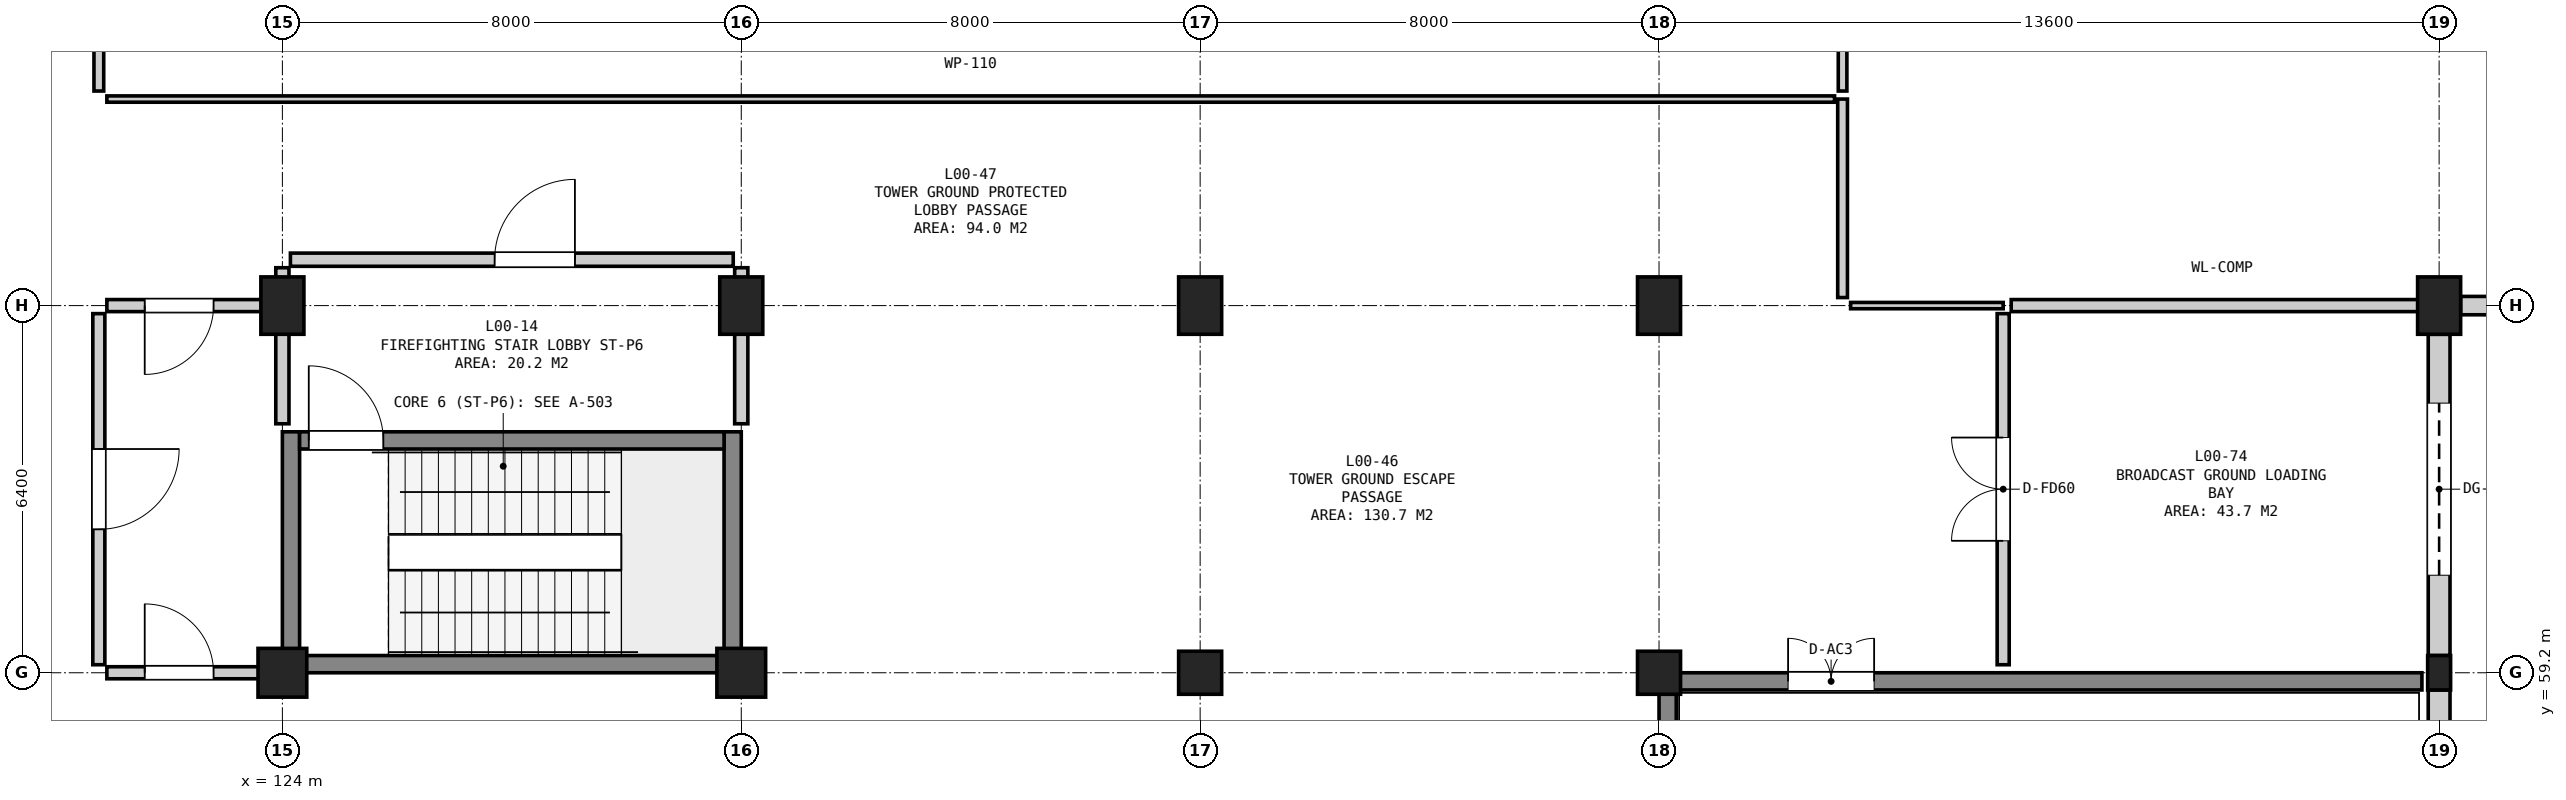
"""IFC4 building model, lengths in metres.
Left out: names, types, materials, properties, quantities, classifications, styles, units other than length and angle.
Written with IfcOpenShell. Run it as: python <this file> out.ifc"""

import sys

from ifc_helpers import new_model, si_unit, direction, frame, frame_2d, origin, origin_2d, place, context, subcontext, project, spatial, rectangle, extrude, element, fill, save


model = new_model("IFC4")
c1 = context("Model", 3, precision=1e-05, world=origin(), true_north=direction((0.0, 1.0)))
c2 = subcontext(c1, "Body", "Model", "MODEL_VIEW")
j1 = project(units=[si_unit("LENGTHUNIT", "METRE"), si_unit("PLANEANGLEUNIT", "RADIAN")], contexts=[c1])
p1 = place(None, origin())
s1 = spatial("IfcSite", under=j1, at=p1, CompositionType="ELEMENT")
p2 = place(p1, origin())
s2 = spatial("IfcBuilding", under=s1, at=p2, CompositionType="ELEMENT")
p3 = place(p2, origin())
s3 = spatial("IfcBuildingStorey", under=s2, at=p3, CompositionType="ELEMENT", Elevation=0.0)
p4 = place(p3, frame((124.0, 59.2, 0.0), z_axis=(0.0, 0.0, 1.0), x_axis=(1.0, 0.0, 0.0)))
e1 = element("IfcColumn", 1, at=p4, inside=s3, PredefinedType="COLUMN", context=c2, shape_type="SweptSolid", body=[
    extrude(rectangle(XDim=0.85, YDim=0.85, at=origin_2d()), origin(), (0.0, 0.0, 1.0), 5.4),
])
p5 = place(p3, frame((124.0, 65.6, 0.0), z_axis=(0.0, 0.0, 1.0), x_axis=(1.0, 0.0, 0.0)))
e2 = element("IfcColumn", 2, at=p5, inside=s3, PredefinedType="COLUMN", context=c2, shape_type="SweptSolid", body=[
    extrude(rectangle(XDim=0.75, YDim=1.0, at=origin_2d()), origin(), (0.0, 0.0, 1.0), 5.4),
])
p6 = place(p3, frame((132.0, 59.2, 0.0), z_axis=(0.0, 0.0, 1.0), x_axis=(1.0, 0.0, 0.0)))
e3 = element("IfcColumn", 3, at=p6, inside=s3, PredefinedType="COLUMN", context=c2, shape_type="SweptSolid", body=[
    extrude(rectangle(XDim=0.85, YDim=0.85, at=origin_2d()), origin(), (0.0, 0.0, 1.0), 5.4),
])
p7 = place(p3, frame((132.0, 65.6, 0.0), z_axis=(0.0, 0.0, 1.0), x_axis=(1.0, 0.0, 0.0)))
e4 = element("IfcColumn", 4, at=p7, inside=s3, PredefinedType="COLUMN", context=c2, shape_type="SweptSolid", body=[
    extrude(rectangle(XDim=0.75, YDim=1.0, at=origin_2d()), origin(), (0.0, 0.0, 1.0), 5.4),
])
p8 = place(p3, frame((140.0, 59.2, 0.0), z_axis=(0.0, 0.0, 1.0), x_axis=(1.0, 0.0, 0.0)))
e5 = element("IfcColumn", 5, at=p8, inside=s3, PredefinedType="COLUMN", context=c2, shape_type="SweptSolid", body=[
    extrude(rectangle(XDim=0.75, YDim=0.75, at=origin_2d()), origin(), (0.0, 0.0, 1.0), 5.4),
])
p9 = place(p3, frame((140.0, 65.6, 0.0), z_axis=(0.0, 0.0, 1.0), x_axis=(1.0, 0.0, 0.0)))
e6 = element("IfcColumn", 6, at=p9, inside=s3, PredefinedType="COLUMN", context=c2, shape_type="SweptSolid", body=[
    extrude(rectangle(XDim=0.75, YDim=1.0, at=origin_2d()), origin(), (0.0, 0.0, 1.0), 5.4),
])
p10 = place(p3, frame((148.0, 59.2, 0.0), z_axis=(0.0, 0.0, 1.0), x_axis=(1.0, 0.0, 0.0)))
e7 = element("IfcColumn", 7, at=p10, inside=s3, PredefinedType="COLUMN", context=c2, shape_type="SweptSolid", body=[
    extrude(rectangle(XDim=0.75, YDim=0.75, at=origin_2d()), origin(), (0.0, 0.0, 1.0), 5.4),
])
p11 = place(p3, frame((148.0, 65.6, 0.0), z_axis=(0.0, 0.0, 1.0), x_axis=(1.0, 0.0, 0.0)))
e8 = element("IfcColumn", 8, at=p11, inside=s3, PredefinedType="COLUMN", context=c2, shape_type="SweptSolid", body=[
    extrude(rectangle(XDim=0.75, YDim=1.0, at=origin_2d()), origin(), (0.0, 0.0, 1.0), 5.4),
])
p12 = place(p3, frame((161.6, 59.2, 0.0), z_axis=(0.0, 0.0, 1.0), x_axis=(1.0, 0.0, 0.0)))
e9 = element("IfcColumn", 9, at=p12, inside=s3, PredefinedType="COLUMN", context=c2, shape_type="SweptSolid", body=[
    extrude(rectangle(XDim=0.4, YDim=0.6, at=origin_2d()), origin(), (0.0, 0.0, 1.0), 5.4),
])
p13 = place(p3, frame((161.6, 65.6, 0.0), z_axis=(0.0, 0.0, 1.0), x_axis=(1.0, 0.0, 0.0)))
e10 = element("IfcColumn", 10, at=p13, inside=s3, PredefinedType="COLUMN", context=c2, shape_type="SweptSolid", body=[
    extrude(rectangle(XDim=0.75, YDim=1.0, at=origin_2d()), origin(), (0.0, 0.0, 1.0), 5.4),
])
p14 = place(p3, frame((161.6, 51.525, 0.0), z_axis=(0.0, 0.0, 1.0), x_axis=(0.0, 1.0, 0.0)))
e11 = element("IfcWall", 11, at=p14, inside=s3, PredefinedType="SOLIDWALL", context=c2, shape_type="SweptSolid", body=[
    extrude(rectangle(XDim=7.375, YDim=0.38, at=frame_2d((3.688, 0.0))), origin(), (0.0, 0.0, 1.0), 4.515),
])
p15 = place(p3, frame((161.6, 59.5, 0.0), z_axis=(0.0, 0.0, 1.0), x_axis=(0.0, 1.0, 0.0)))
e12 = element("IfcWall", 12, at=p15, inside=s3, PredefinedType="SOLIDWALL", context=c2, shape_type="SweptSolid", body=[
    extrude(rectangle(XDim=5.6, YDim=0.38, at=frame_2d((2.8, 0.0))), origin(), (0.0, 0.0, 1.0), 4.495),
])
p16 = place(p15, frame((1.4, 0.0, 0.0)))
e13 = element("IfcOpeningElement", 13, at=p16, cuts=e12, PredefinedType="OPENING", context=c2, shape_type="SweptSolid", body=[
    extrude(rectangle(XDim=3.0, YDim=3.2, at=frame_2d((1.5, 1.6))), frame((0.0, 0.202, 0.0), z_axis=(0.0, -1.0, 0.0), x_axis=(1.0, 0.0, 0.0)), (0.0, 0.0, 1.0), 0.404),
])
p17 = place(p3, frame((161.975, 65.6, 0.0), z_axis=(0.0, 0.0, 1.0), x_axis=(1.0, 0.0, 0.0)))
e14 = element("IfcWall", 14, at=p17, inside=s3, PredefinedType="SOLIDWALL", context=c2, shape_type="SweptSolid", body=[
    extrude(rectangle(XDim=5.65, YDim=0.32, at=frame_2d((2.825, 0.0))), origin(), (0.0, 0.0, 1.0), 4.48),
])
p18 = place(p17, frame((2.225, 0.0, 0.9)))
e15 = element("IfcOpeningElement", 15, at=p18, cuts=e14, PredefinedType="OPENING", context=c2, shape_type="SweptSolid", body=[
    extrude(rectangle(XDim=1.2, YDim=1.7, at=frame_2d((0.6, 0.85))), frame((0.0, 0.172, 0.0), z_axis=(0.0, -1.0, 0.0), x_axis=(1.0, 0.0, 0.0)), (0.0, 0.0, 1.0), 0.344),
])
p19 = place(p3, frame((148.3, 59.05, 0.0), z_axis=(0.0, 0.0, 1.0), x_axis=(1.0, 0.0, 0.0)))
e16 = element("IfcWall", 16, at=p19, inside=s3, PredefinedType="SHEAR", context=c2, shape_type="SweptSolid", body=[
    extrude(rectangle(XDim=13.0, YDim=0.3, at=frame_2d((6.5, 0.0))), origin(), (0.0, 0.0, 1.0), 5.08),
])
p20 = place(p19, frame((1.95, 0.0, 0.0)))
e17 = element("IfcOpeningElement", 17, at=p20, cuts=e16, PredefinedType="OPENING", context=c2, shape_type="SweptSolid", body=[
    extrude(rectangle(XDim=1.5, YDim=2.2, at=frame_2d((0.75, 1.1))), frame((0.0, 0.162, 0.0), z_axis=(0.0, -1.0, 0.0), x_axis=(1.0, 0.0, 0.0)), (0.0, 0.0, 1.0), 0.324),
])
p21 = place(p3, frame((148.15, 51.35, 0.0), z_axis=(0.0, 0.0, 1.0), x_axis=(0.0, 1.0, 0.0)))
e18 = element("IfcWall", 18, at=p21, inside=s3, PredefinedType="SHEAR", context=c2, shape_type="SweptSolid", body=[
    extrude(rectangle(XDim=7.85, YDim=0.3, at=frame_2d((3.925, 0.0))), origin(), (0.0, 0.0, 1.0), 5.08),
])
for number, where, z_axis, x_axis in (
    (19, (124.15, 59.2, 0.0), (0.0, 0.0, 1.0), (0.0, 1.0, 0.0)),
    (20, (131.85, 59.2, 0.0), (0.0, 0.0, 1.0), (0.0, 1.0, 0.0)),
):
    element("IfcWall", number, at=place(p3, frame(where, z_axis=z_axis, x_axis=x_axis)), inside=s3, PredefinedType="SHEAR", context=c2, shape_type="SweptSolid", body=[
        extrude(rectangle(XDim=4.2, YDim=0.3, at=frame_2d((2.1, 0.0))), origin(), (0.0, 0.0, 1.0), 5.08),
    ])
p22 = place(p3, frame((124.3, 59.35, 0.0), z_axis=(0.0, 0.0, 1.0), x_axis=(1.0, 0.0, 0.0)))
e21 = element("IfcWall", 21, at=p22, inside=s3, PredefinedType="SHEAR", context=c2, shape_type="SweptSolid", body=[
    extrude(rectangle(XDim=7.4, YDim=0.3, at=frame_2d((3.7, 0.0))), origin(), (0.0, 0.0, 1.0), 5.08),
])
p23 = place(p3, frame((124.3, 63.25, 0.0), z_axis=(0.0, 0.0, 1.0), x_axis=(1.0, 0.0, 0.0)))
e22 = element("IfcWall", 22, at=p23, inside=s3, PredefinedType="SHEAR", context=c2, shape_type="SweptSolid", body=[
    extrude(rectangle(XDim=7.4, YDim=0.3, at=frame_2d((3.7, 0.0))), origin(), (0.0, 0.0, 1.0), 5.08),
])
p24 = place(p23, frame((0.16, 0.0, 0.0)))
e23 = element("IfcOpeningElement", 23, at=p24, cuts=e22, PredefinedType="OPENING", context=c2, shape_type="SweptSolid", body=[
    extrude(rectangle(XDim=1.3, YDim=2.18, at=frame_2d((0.65, 1.09))), frame((0.0, 0.162, 0.0), z_axis=(0.0, -1.0, 0.0), x_axis=(1.0, 0.0, 0.0)), (0.0, 0.0, 1.0), 0.324),
])
p25 = place(p3, frame((124.14, 66.4, 0.0), z_axis=(0.0, 0.0, 1.0), x_axis=(1.0, 0.0, 0.0)))
e24 = element("IfcWall", 24, at=p25, inside=s3, PredefinedType="SOLIDWALL", context=c2, shape_type="SweptSolid", body=[
    extrude(rectangle(XDim=7.72, YDim=0.23, at=frame_2d((3.86, 0.0))), origin(), (0.0, 0.0, 1.0), 5.08),
])
p26 = place(p25, frame((3.56, 0.0, 0.0)))
e25 = element("IfcOpeningElement", 25, at=p26, cuts=e24, PredefinedType="OPENING", context=c2, shape_type="SweptSolid", body=[
    extrude(rectangle(XDim=1.4, YDim=2.2, at=frame_2d((0.7, 1.1))), frame((0.0, 0.127, 0.0), z_axis=(0.0, -1.0, 0.0), x_axis=(1.0, 0.0, 0.0)), (0.0, 0.0, 1.0), 0.254),
])
p27 = place(p3, frame((124.0, 63.54, 0.0), z_axis=(0.0, 0.0, 1.0), x_axis=(0.0, 1.0, 0.0)))
e26 = element("IfcWall", 26, at=p27, inside=s3, PredefinedType="SOLIDWALL", context=c2, shape_type="SweptSolid", body=[
    extrude(rectangle(XDim=2.72, YDim=0.23, at=frame_2d((1.36, 0.0))), origin(), (0.0, 0.0, 1.0), 4.225),
])
p28 = place(p3, frame((132.0, 63.54, 0.0), z_axis=(0.0, 0.0, 1.0), x_axis=(0.0, 1.0, 0.0)))
e27 = element("IfcWall", 27, at=p28, inside=s3, PredefinedType="SOLIDWALL", context=c2, shape_type="SweptSolid", body=[
    extrude(rectangle(XDim=2.72, YDim=0.23, at=frame_2d((1.36, 0.0))), origin(), (0.0, 0.0, 1.0), 4.575),
])
p29 = place(p3, frame((120.94, 59.2, 0.0), z_axis=(0.0, 0.0, 1.0), x_axis=(1.0, 0.0, 0.0)))
e28 = element("IfcWall", 28, at=p29, inside=s3, PredefinedType="SOLIDWALL", context=c2, shape_type="SweptSolid", body=[
    extrude(rectangle(XDim=2.92, YDim=0.21, at=frame_2d((1.46, 0.0))), origin(), (0.0, 0.0, 1.0), 4.475),
])
p30 = place(p29, frame((0.66, 0.0, 0.0)))
e29 = element("IfcOpeningElement", 29, at=p30, cuts=e28, PredefinedType="OPENING", context=c2, shape_type="SweptSolid", body=[
    extrude(rectangle(XDim=1.2, YDim=2.2, at=frame_2d((0.6, 1.1))), frame((0.0, 0.117, 0.0), z_axis=(0.0, -1.0, 0.0), x_axis=(1.0, 0.0, 0.0)), (0.0, 0.0, 1.0), 0.234),
])
p31 = place(p3, frame((120.94, 65.6, 0.0), z_axis=(0.0, 0.0, 1.0), x_axis=(1.0, 0.0, 0.0)))
e30 = element("IfcWall", 30, at=p31, inside=s3, PredefinedType="SOLIDWALL", context=c2, shape_type="SweptSolid", body=[
    extrude(rectangle(XDim=2.92, YDim=0.21, at=frame_2d((1.46, 0.0))), origin(), (0.0, 0.0, 1.0), 4.275),
])
p32 = place(p31, frame((0.66, 0.0, 0.0)))
e31 = element("IfcOpeningElement", 31, at=p32, cuts=e30, PredefinedType="OPENING", context=c2, shape_type="SweptSolid", body=[
    extrude(rectangle(XDim=1.2, YDim=2.2, at=frame_2d((0.6, 1.1))), frame((0.0, 0.117, 0.0), z_axis=(0.0, -1.0, 0.0), x_axis=(1.0, 0.0, 0.0)), (0.0, 0.0, 1.0), 0.234),
])
p33 = place(p3, frame((120.8, 59.34, 0.0), z_axis=(0.0, 0.0, 1.0), x_axis=(0.0, 1.0, 0.0)))
e32 = element("IfcWall", 32, at=p33, inside=s3, PredefinedType="SOLIDWALL", context=c2, shape_type="SweptSolid", body=[
    extrude(rectangle(XDim=6.12, YDim=0.21, at=frame_2d((3.06, 0.0))), origin(), (0.0, 0.0, 1.0), 5.08),
])
p34 = place(p33, frame((2.36, 0.0, 0.0)))
e33 = element("IfcOpeningElement", 33, at=p34, cuts=e32, PredefinedType="OPENING", context=c2, shape_type="SweptSolid", body=[
    extrude(rectangle(XDim=1.4, YDim=2.2, at=frame_2d((0.7, 1.1))), frame((0.0, 0.117, 0.0), z_axis=(0.0, -1.0, 0.0), x_axis=(1.0, 0.0, 0.0)), (0.0, 0.0, 1.0), 0.234),
])
p35 = place(p3, frame((154.14, 65.6, 0.0), z_axis=(0.0, 0.0, 1.0), x_axis=(1.0, 0.0, 0.0)))
e34 = element("IfcWall", 34, at=p35, inside=s3, PredefinedType="SOLIDWALL", context=c2, shape_type="SweptSolid", body=[
    extrude(rectangle(XDim=7.355, YDim=0.21, at=frame_2d((3.678, 0.0))), origin(), (0.0, 0.0, 1.0), 4.025),
])
p36 = place(p3, frame((154.0, 59.34, 0.0), z_axis=(0.0, 0.0, 1.0), x_axis=(0.0, 1.0, 0.0)))
e35 = element("IfcWall", 35, at=p36, inside=s3, PredefinedType="SOLIDWALL", context=c2, shape_type="SweptSolid", body=[
    extrude(rectangle(XDim=6.12, YDim=0.21, at=frame_2d((3.06, 0.0))), origin(), (0.0, 0.0, 1.0), 5.08),
])
p37 = place(p36, frame((2.16, 0.0, 0.0)))
e36 = element("IfcOpeningElement", 36, at=p37, cuts=e35, PredefinedType="OPENING", context=c2, shape_type="SweptSolid", body=[
    extrude(rectangle(XDim=1.8, YDim=2.3, at=frame_2d((0.9, 1.15))), frame((0.0, 0.117, 0.0), z_axis=(0.0, -1.0, 0.0), x_axis=(1.0, 0.0, 0.0)), (0.0, 0.0, 1.0), 0.234),
])
p38 = place(p3, frame((120.94, 69.2, 0.0), z_axis=(0.0, 0.0, 1.0), x_axis=(1.0, 0.0, 0.0)))
e37 = element("IfcWall", 37, at=p38, inside=s3, PredefinedType="PARTITIONING", context=c2, shape_type="SweptSolid", body=[
    extrude(rectangle(XDim=30.12, YDim=0.11, at=frame_2d((15.06, 0.0))), origin(), (0.0, 0.0, 1.0), 5.08),
])
p39 = place(p3, frame((120.8, 69.34, 0.0), z_axis=(0.0, 0.0, 1.0), x_axis=(0.0, 1.0, 0.0)))
e38 = element("IfcWall", 38, at=p39, inside=s3, PredefinedType="PARTITIONING", context=c2, shape_type="SweptSolid", body=[
    extrude(rectangle(XDim=6.52, YDim=0.17, at=frame_2d((3.26, 0.0))), origin(), (0.0, 0.0, 1.0), 5.08),
])
p40 = place(p3, frame((151.2, 69.34, 0.0), z_axis=(0.0, 0.0, 1.0), x_axis=(0.0, 1.0, 0.0)))
e39 = element("IfcWall", 39, at=p40, inside=s3, PredefinedType="PARTITIONING", context=c2, shape_type="SweptSolid", body=[
    extrude(rectangle(XDim=6.52, YDim=0.15, at=frame_2d((3.26, 0.0))), origin(), (0.0, 0.0, 1.0), 5.08),
])
p41 = place(p3, frame((151.34, 65.6, 0.0), z_axis=(0.0, 0.0, 1.0), x_axis=(1.0, 0.0, 0.0)))
e40 = element("IfcWall", 40, at=p41, inside=s3, PredefinedType="PARTITIONING", context=c2, shape_type="SweptSolid", body=[
    extrude(rectangle(XDim=2.66, YDim=0.11, at=frame_2d((1.33, 0.0))), origin(), (0.0, 0.0, 1.0), 4.025),
])
p42 = place(p3, frame((151.2, 65.74, 0.0), z_axis=(0.0, 0.0, 1.0), x_axis=(0.0, 1.0, 0.0)))
e41 = element("IfcWall", 41, at=p42, inside=s3, PredefinedType="PARTITIONING", context=c2, shape_type="SweptSolid", body=[
    extrude(rectangle(XDim=3.46, YDim=0.17, at=frame_2d((1.73, 0.0))), origin(), (0.0, 0.0, 1.0), 5.08),
])
p43 = place(p16, frame((3.0, 0.0, 0.0), z_axis=(0.0, 0.0, 1.0), x_axis=(-1.0, 0.0, 0.0)))
e42 = element("IfcDoor", 42, at=p43, inside=s3, OperationType="ROLLINGUP", PredefinedType="GATE", context=c2, shape_type="SweptSolid", body=[
    extrude(rectangle(XDim=3.0, YDim=3.2, at=frame_2d((1.5, 1.6))), frame((0.0, 0.025, 0.0), z_axis=(0.0, -1.0, 0.0), x_axis=(1.0, 0.0, 0.0)), (0.0, 0.0, 1.0), 0.05),
])
fill(e13, e42)
p44 = place(p20, origin())
e43 = element("IfcDoor", 43, at=p44, inside=s3, OperationType="DOUBLE_DOOR_SINGLE_SWING", PredefinedType="DOOR", context=c2, shape_type="SweptSolid", body=[
    extrude(rectangle(XDim=1.5, YDim=2.2, at=frame_2d((0.75, 1.1))), frame((0.0, 0.025, 0.0), z_axis=(0.0, -1.0, 0.0), x_axis=(1.0, 0.0, 0.0)), (0.0, 0.0, 1.0), 0.05),
])
fill(e17, e43)
p45 = place(p24, origin())
e44 = element("IfcDoor", 44, at=p45, inside=s3, OperationType="SINGLE_SWING_LEFT", PredefinedType="DOOR", context=c2, shape_type="SweptSolid", body=[
    extrude(rectangle(XDim=1.3, YDim=2.18, at=frame_2d((0.65, 1.09))), frame((0.0, 0.025, 0.0), z_axis=(0.0, -1.0, 0.0), x_axis=(1.0, 0.0, 0.0)), (0.0, 0.0, 1.0), 0.05),
])
fill(e23, e44)
p46 = place(p26, origin())
e45 = element("IfcDoor", 45, at=p46, inside=s3, OperationType="SINGLE_SWING_RIGHT", PredefinedType="DOOR", context=c2, shape_type="SweptSolid", body=[
    extrude(rectangle(XDim=1.4, YDim=2.2, at=frame_2d((0.7, 1.1))), frame((0.0, 0.025, 0.0), z_axis=(0.0, -1.0, 0.0), x_axis=(1.0, 0.0, 0.0)), (0.0, 0.0, 1.0), 0.05),
])
fill(e25, e45)
p47 = place(p30, origin())
e46 = element("IfcDoor", 46, at=p47, inside=s3, OperationType="SINGLE_SWING_LEFT", PredefinedType="DOOR", context=c2, shape_type="SweptSolid", body=[
    extrude(rectangle(XDim=1.2, YDim=2.2, at=frame_2d((0.6, 1.1))), frame((0.0, 0.025, 0.0), z_axis=(0.0, -1.0, 0.0), x_axis=(1.0, 0.0, 0.0)), (0.0, 0.0, 1.0), 0.05),
])
fill(e29, e46)
p48 = place(p32, frame((1.2, 0.0, 0.0), z_axis=(0.0, 0.0, 1.0), x_axis=(-1.0, 0.0, 0.0)))
e47 = element("IfcDoor", 47, at=p48, inside=s3, OperationType="SINGLE_SWING_RIGHT", PredefinedType="DOOR", context=c2, shape_type="SweptSolid", body=[
    extrude(rectangle(XDim=1.2, YDim=2.2, at=frame_2d((0.6, 1.1))), frame((0.0, 0.025, 0.0), z_axis=(0.0, -1.0, 0.0), x_axis=(1.0, 0.0, 0.0)), (0.0, 0.0, 1.0), 0.05),
])
fill(e31, e47)
p49 = place(p34, frame((1.4, 0.0, 0.0), z_axis=(0.0, 0.0, 1.0), x_axis=(-1.0, 0.0, 0.0)))
e48 = element("IfcDoor", 48, at=p49, inside=s3, OperationType="SINGLE_SWING_LEFT", PredefinedType="DOOR", context=c2, shape_type="SweptSolid", body=[
    extrude(rectangle(XDim=1.4, YDim=2.2, at=frame_2d((0.7, 1.1))), frame((0.0, 0.025, 0.0), z_axis=(0.0, -1.0, 0.0), x_axis=(1.0, 0.0, 0.0)), (0.0, 0.0, 1.0), 0.05),
])
fill(e33, e48)
p50 = place(p37, origin())
e49 = element("IfcDoor", 49, at=p50, inside=s3, OperationType="DOUBLE_DOOR_SINGLE_SWING", PredefinedType="DOOR", context=c2, shape_type="SweptSolid", body=[
    extrude(rectangle(XDim=1.8, YDim=2.3, at=frame_2d((0.9, 1.15))), frame((0.0, 0.025, 0.0), z_axis=(0.0, -1.0, 0.0), x_axis=(1.0, 0.0, 0.0)), (0.0, 0.0, 1.0), 0.05),
])
fill(e36, e49)
save(model, sys.argv[1])
